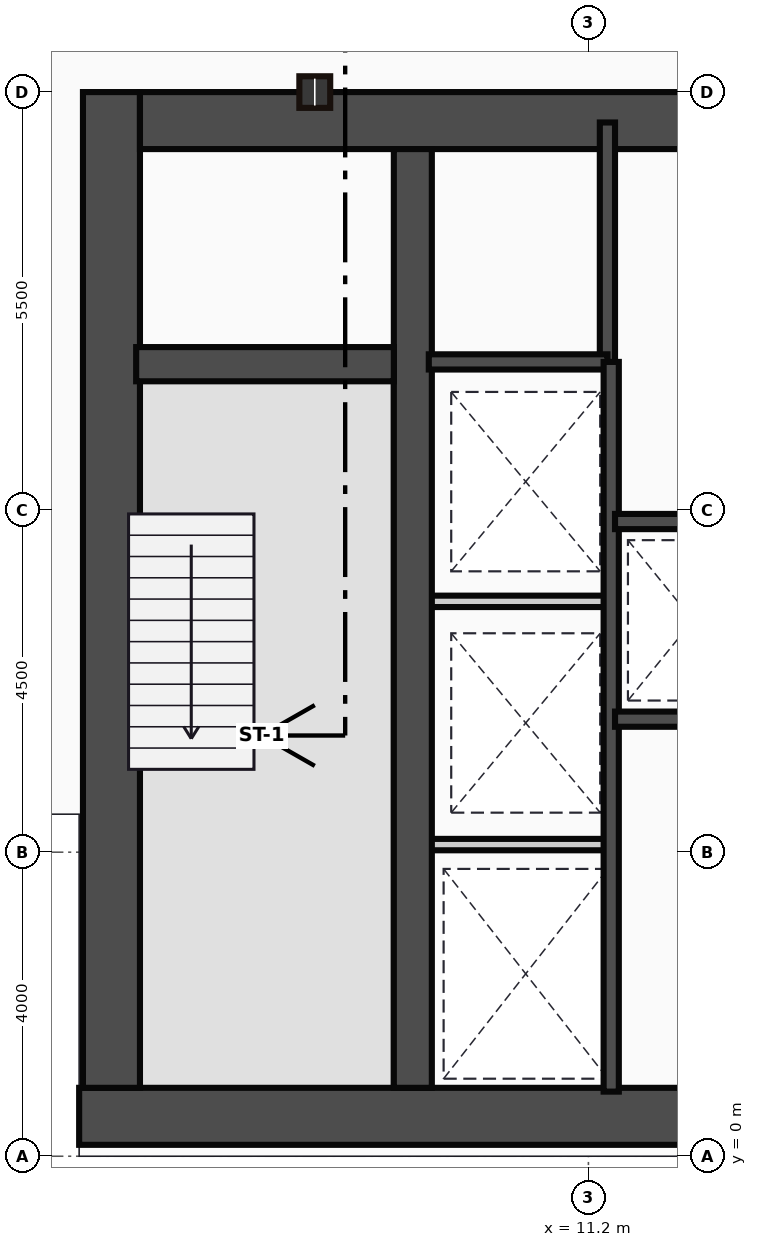
"""IFC4 building model, lengths in metres.
Left out: names, types, materials, properties, quantities, classifications, styles, units other than length and angle.
Written with IfcOpenShell. Run it as: python <this file> out.ifc"""

import sys

from ifc_helpers import new_model, si_unit, direction, frame, frame_2d, origin, origin_2d, place, context, subcontext, project, spatial, rectangle, i_section, extrude, source, transform, mapped, element, fill, save


model = new_model("IFC4")
c1 = context("Model", 3, precision=1e-05, world=origin(), true_north=direction((0.0, 1.0)))
c2 = subcontext(c1, "Body", "Model", "MODEL_VIEW")
j1 = project(units=[si_unit("LENGTHUNIT", "METRE"), si_unit("PLANEANGLEUNIT", "RADIAN")], contexts=[c1])
p1 = place(None, origin())
s1 = spatial("IfcSite", under=j1, at=p1, CompositionType="ELEMENT")
p2 = place(p1, origin())
s2 = spatial("IfcBuilding", under=s1, at=p2, CompositionType="ELEMENT")
p3 = place(p2, frame((0.0, 0.0, 84.15)))
s3 = spatial("IfcBuildingStorey", under=s2, at=p3, CompositionType="ELEMENT", Elevation=84.15)
m1 = source(origin(), c2, "Body", "SweptSolid", [
    extrude(rectangle(XDim=29.5, YDim=0.75, at=frame_2d((14.75, 0.0))), origin(), (0.0, 0.0, 1.0), 4.5),
])
p4 = place(p3, frame((4.5, 0.525, 0.0), z_axis=(0.0, 0.0, 1.0), x_axis=(1.0, 0.0, 0.0)))
e1 = element("IfcWall", 1, at=p4, inside=s3, PredefinedType="SHEAR", context=c2, shape_type="MappedRepresentation", body=[
    mapped(m1, transform((0.0, 0.0, 0.0))),
])
m2 = source(origin(), c2, "Body", "SweptSolid", [
    extrude(rectangle(XDim=13.1, YDim=0.75, at=frame_2d((6.55, 0.0))), origin(), (0.0, 0.0, 1.0), 4.5),
])
p5 = place(p3, frame((4.925, 0.9, 0.0), z_axis=(0.0, 0.0, 1.0), x_axis=(0.0, 1.0, 0.0)))
e2 = element("IfcWall", 2, at=p5, inside=s3, PredefinedType="SHEAR", context=c2, shape_type="MappedRepresentation", body=[
    mapped(m2, transform((0.0, 0.0, 0.0))),
])
m3 = source(origin(), c2, "Body", "SweptSolid", [
    extrude(rectangle(XDim=9.1, YDim=0.75, at=frame_2d((4.55, 0.0))), origin(), (0.0, 0.0, 1.0), 4.5),
])
p6 = place(p3, frame((5.3, 13.625, 0.0), z_axis=(0.0, 0.0, 1.0), x_axis=(1.0, 0.0, 0.0)))
e3 = element("IfcWall", 3, at=p6, inside=s3, PredefinedType="SHEAR", context=c2, shape_type="MappedRepresentation", body=[
    mapped(m3, transform((0.0, 0.0, 0.0))),
])
p7 = place(p6, frame((4.1, 0.0, 0.0)))
e4 = element("IfcOpeningElement", 4, at=p7, cuts=e3, PredefinedType="OPENING", context=c2, shape_type="SweptSolid", body=[
    extrude(rectangle(XDim=1.1, YDim=2.15, at=frame_2d((0.55, 1.075))), frame((0.0, 0.385, 0.0), z_axis=(0.0, -1.0, 0.0), x_axis=(1.0, 0.0, 0.0)), (0.0, 0.0, 1.0), 0.77),
])
m4 = source(origin(), c2, "Body", "SweptSolid", [
    extrude(rectangle(XDim=12.35, YDim=0.5, at=frame_2d((6.175, 0.0))), origin(), (0.0, 0.0, 1.0), 4.5),
])
p8 = place(p3, frame((8.89, 0.9, 0.0), z_axis=(0.0, 0.0, 1.0), x_axis=(0.0, 1.0, 0.0)))
e5 = element("IfcWall", 5, at=p8, inside=s3, PredefinedType="SHEAR", context=c2, shape_type="MappedRepresentation", body=[
    mapped(m4, transform((0.0, 0.0, 0.0))),
])
m5 = source(origin(), c2, "Body", "SweptSolid", [
    extrude(rectangle(XDim=3.39, YDim=0.45, at=frame_2d((1.695, 0.0))), origin(), (0.0, 0.0, 1.0), 4.5),
])
p9 = place(p3, frame((5.25, 10.42, 0.0), z_axis=(0.0, 0.0, 1.0), x_axis=(1.0, 0.0, 0.0)))
e6 = element("IfcWall", 6, at=p9, inside=s3, PredefinedType="SHEAR", context=c2, shape_type="MappedRepresentation", body=[
    mapped(m5, transform((0.0, 0.0, 0.0))),
])
p10 = place(p9, frame((1.05, 0.0, 0.0)))
e7 = element("IfcOpeningElement", 7, at=p10, cuts=e6, PredefinedType="OPENING", context=c2, shape_type="SweptSolid", body=[
    extrude(rectangle(XDim=1.1, YDim=2.15, at=frame_2d((0.55, 1.075))), frame((0.0, 0.235, 0.0), z_axis=(0.0, -1.0, 0.0), x_axis=(1.0, 0.0, 0.0)), (0.0, 0.0, 1.0), 0.47),
])
m6 = source(origin(), c2, "Body", "SweptSolid", [
    extrude(i_section(OverallWidth=0.406, OverallDepth=0.416, WebThickness=0.03, FlangeThickness=0.048, at=origin_2d()), origin(), (0.0, 0.0, 1.0), 4.5),
])
p11 = place(p3, frame((7.6, 14.0, 0.0), z_axis=(0.0, 0.0, 1.0), x_axis=(1.0, 0.0, 0.0)))
e8 = element("IfcColumn", 8, at=p11, inside=s3, PredefinedType="COLUMN", context=c2, shape_type="MappedRepresentation", body=[
    mapped(m6, transform((0.0, 0.0, 0.0))),
])
m7 = source(origin(), c2, "Body", "SweptSolid", [
    extrude(rectangle(XDim=3.18, YDim=0.2, at=frame_2d((1.59, 0.0))), origin(), (0.0, 0.0, 1.0), 4.25),
])
p12 = place(p3, frame((11.45, 10.42, 0.0), z_axis=(0.0, 0.0, 1.0), x_axis=(0.0, 1.0, 0.0)))
e9 = element("IfcWall", 9, at=p12, inside=s3, PredefinedType="PARTITIONING", context=c2, shape_type="MappedRepresentation", body=[
    mapped(m7, transform((0.0, 0.0, 0.0))),
])
m8 = source(origin(), c2, "Body", "SweptSolid", [
    extrude(rectangle(XDim=2.35, YDim=0.2, at=frame_2d((1.175, 0.0))), origin(), (0.0, 0.0, 1.0), 4.25),
])
p13 = place(p3, frame((9.1, 10.45, 0.0), z_axis=(0.0, 0.0, 1.0), x_axis=(1.0, 0.0, 0.0)))
e10 = element("IfcWall", 10, at=p13, inside=s3, PredefinedType="PARTITIONING", context=c2, shape_type="MappedRepresentation", body=[
    mapped(m8, transform((0.0, 0.0, 0.0))),
])
p14 = place(p13, frame((0.55, 0.0, 0.0)))
e11 = element("IfcOpeningElement", 11, at=p14, cuts=e10, PredefinedType="OPENING", context=c2, shape_type="SweptSolid", body=[
    extrude(rectangle(XDim=1.1, YDim=2.15, at=frame_2d((0.55, 1.075))), frame((0.0, 0.11, 0.0), z_axis=(0.0, -1.0, 0.0), x_axis=(1.0, 0.0, 0.0)), (0.0, 0.0, 1.0), 0.22),
])
m9 = source(origin(), c2, "Body", "SweptSolid", [
    extrude(rectangle(XDim=9.6, YDim=0.2, at=frame_2d((4.8, 0.0))), origin(), (0.0, 0.0, 1.0), 4.25),
])
p15 = place(p3, frame((11.5, 0.85, 0.0), z_axis=(0.0, 0.0, 1.0), x_axis=(0.0, 1.0, 0.0)))
e12 = element("IfcWall", 12, at=p15, inside=s3, PredefinedType="PARTITIONING", context=c2, shape_type="MappedRepresentation", body=[
    mapped(m9, transform((0.0, 0.0, 0.0))),
])
p16 = place(p15, frame((4.2, 0.0, 0.0)))
e13 = element("IfcOpeningElement", 13, at=p16, cuts=e12, PredefinedType="OPENING", context=c2, shape_type="SweptSolid", body=[
    extrude(rectangle(XDim=1.1, YDim=2.15, at=frame_2d((0.55, 1.075))), frame((0.0, 0.11, 0.0), z_axis=(0.0, -1.0, 0.0), x_axis=(1.0, 0.0, 0.0)), (0.0, 0.0, 1.0), 0.22),
])
p17 = place(p15, frame((0.9, 0.0, 0.0)))
e14 = element("IfcOpeningElement", 14, at=p17, cuts=e12, PredefinedType="OPENING", context=c2, shape_type="SweptSolid", body=[
    extrude(rectangle(XDim=1.2, YDim=2.15, at=frame_2d((0.6, 1.075))), frame((0.0, 0.11, 0.0), z_axis=(0.0, -1.0, 0.0), x_axis=(1.0, 0.0, 0.0)), (0.0, 0.0, 1.0), 0.22),
])
m10 = source(origin(), c2, "Body", "SweptSolid", [
    extrude(rectangle(XDim=2.4, YDim=0.15, at=frame_2d((1.2, 0.0))), origin(), (0.0, 0.0, 1.0), 4.25),
])
for number, where, z_axis, x_axis in (
    (15, (9.1, 4.1, 0.0), (0.0, 0.0, 1.0), (1.0, 0.0, 0.0)),
    (16, (9.1, 7.3, 0.0), (0.0, 0.0, 1.0), (1.0, 0.0, 0.0)),
):
    element("IfcWall", number, at=place(p3, frame(where, z_axis=z_axis, x_axis=x_axis)), inside=s3, PredefinedType="PARTITIONING", context=c2, shape_type="MappedRepresentation", body=[
        mapped(m10, transform((0.0, 0.0, 0.0))),
    ])
m11 = source(origin(), c2, "Body", "SweptSolid", [
    extrude(rectangle(XDim=11.85, YDim=0.2, at=frame_2d((5.925, 0.0))), origin(), (0.0, 0.0, 1.0), 4.25),
])
for number, where, z_axis, x_axis in (
    (17, (11.55, 5.75, 0.0), (0.0, 0.0, 1.0), (1.0, 0.0, 0.0)),
    (18, (11.55, 8.35, 0.0), (0.0, 0.0, 1.0), (1.0, 0.0, 0.0)),
):
    element("IfcWall", number, at=place(p3, frame(where, z_axis=z_axis, x_axis=x_axis)), inside=s3, PredefinedType="PARTITIONING", context=c2, shape_type="MappedRepresentation", body=[
        mapped(m11, transform((0.0, 0.0, 0.0))),
    ])
m12 = source(origin(), c2, "Body", "SweptSolid", [
    extrude(rectangle(XDim=1.1, YDim=2.15, at=frame_2d((0.55, 1.075))), frame((0.0, 0.025, 0.0), z_axis=(0.0, -1.0, 0.0), x_axis=(1.0, 0.0, 0.0)), (0.0, 0.0, 1.0), 0.05),
])
p18 = place(p10, frame((1.1, 0.0, 0.0), z_axis=(0.0, 0.0, 1.0), x_axis=(-1.0, 0.0, 0.0)))
e19 = element("IfcDoor", 19, at=p18, inside=s3, OperationType="SINGLE_SWING_LEFT", PredefinedType="DOOR", context=c2, shape_type="MappedRepresentation", body=[
    mapped(m12, transform((0.0, 0.0, 0.0))),
])
fill(e7, e19)
p19 = place(p7, origin())
e20 = element("IfcDoor", 20, at=p19, inside=s3, OperationType="SINGLE_SWING_RIGHT", PredefinedType="DOOR", context=c2, shape_type="MappedRepresentation", body=[
    mapped(m12, transform((0.0, 0.0, 0.0))),
])
fill(e4, e20)
p20 = place(p14, origin())
e21 = element("IfcDoor", 21, at=p20, inside=s3, OperationType="SLIDING_TO_LEFT", PredefinedType="DOOR", context=c2, shape_type="MappedRepresentation", body=[
    mapped(m12, transform((0.0, 0.0, 0.0))),
])
fill(e11, e21)
p21 = place(p16, frame((1.1, 0.0, 0.0), z_axis=(0.0, 0.0, 1.0), x_axis=(-1.0, 0.0, 0.0)))
e22 = element("IfcDoor", 22, at=p21, inside=s3, OperationType="SLIDING_TO_LEFT", PredefinedType="DOOR", context=c2, shape_type="MappedRepresentation", body=[
    mapped(m12, transform((0.0, 0.0, 0.0))),
])
fill(e13, e22)
m13 = source(origin(), c2, "Body", "SweptSolid", [
    extrude(rectangle(XDim=1.2, YDim=2.15, at=frame_2d((0.6, 1.075))), frame((0.0, 0.025, 0.0), z_axis=(0.0, -1.0, 0.0), x_axis=(1.0, 0.0, 0.0)), (0.0, 0.0, 1.0), 0.05),
])
p22 = place(p17, frame((1.2, 0.0, 0.0), z_axis=(0.0, 0.0, 1.0), x_axis=(-1.0, 0.0, 0.0)))
e23 = element("IfcDoor", 23, at=p22, inside=s3, OperationType="SLIDING_TO_LEFT", PredefinedType="DOOR", context=c2, shape_type="MappedRepresentation", body=[
    mapped(m13, transform((0.0, 0.0, 0.0))),
])
fill(e14, e23)
save(model, sys.argv[1])
